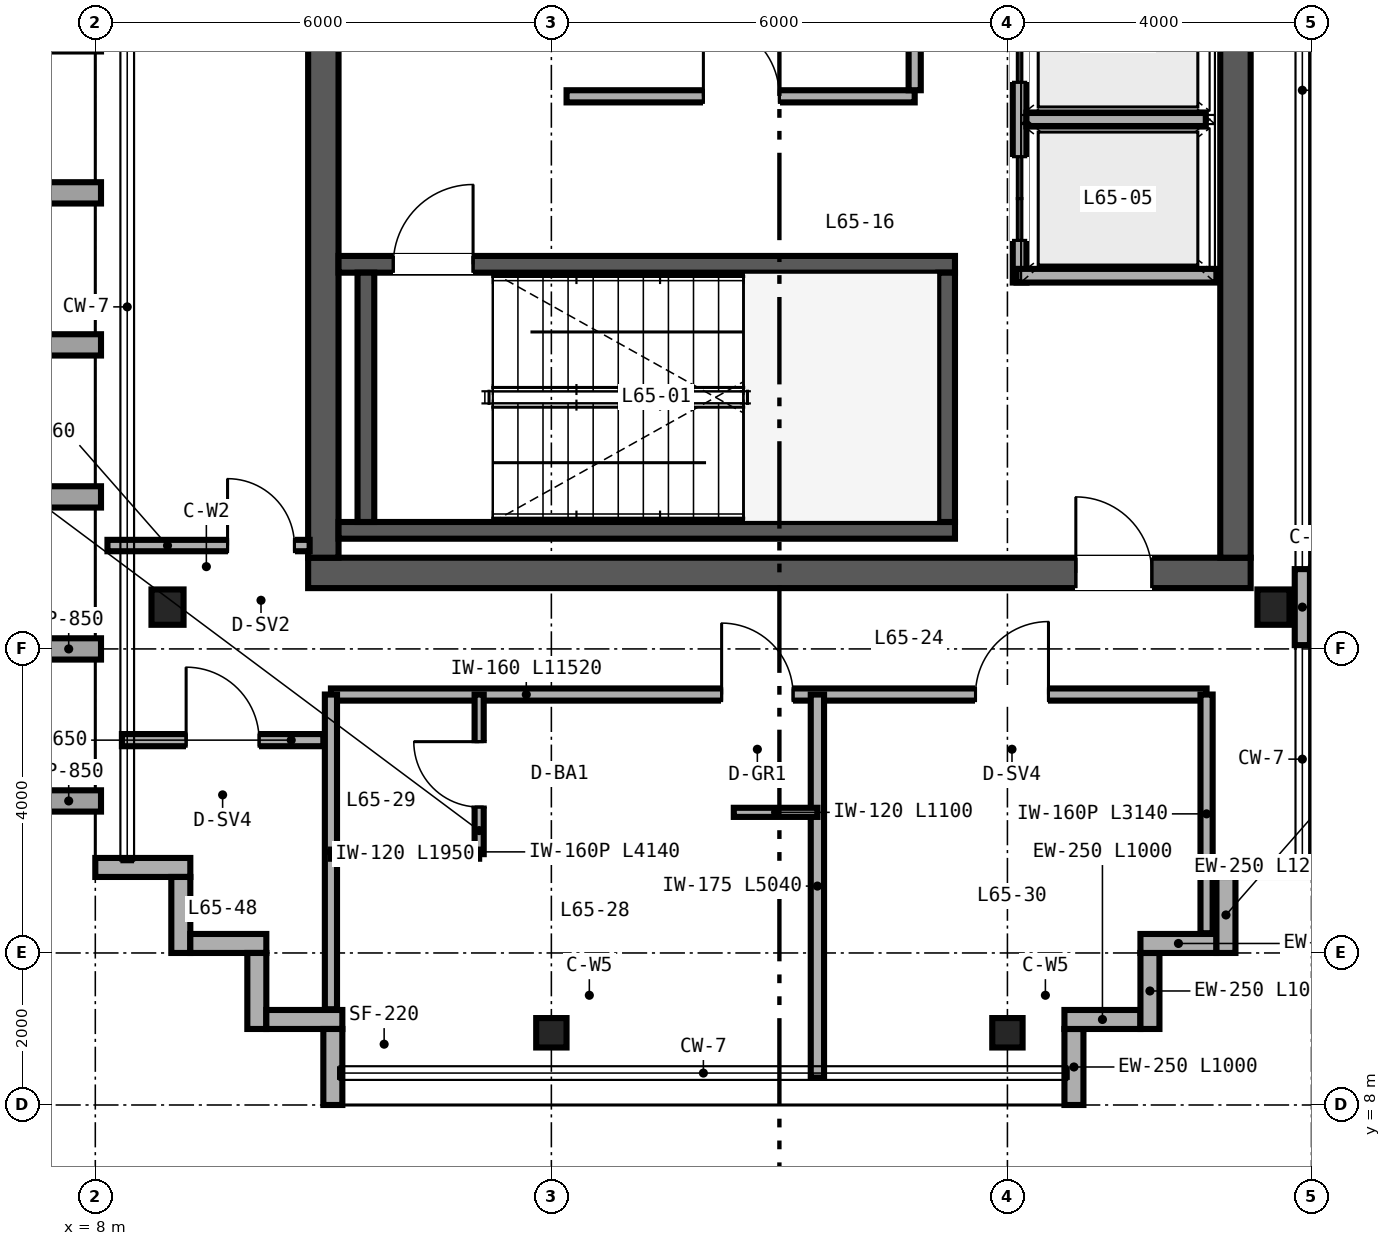
"""IFC4 building model, lengths in metres.
Left out: names, types, materials, properties, quantities, classifications, styles, units other than length and angle.
Written with IfcOpenShell. Run it as: python <this file> out.ifc"""

import sys

from ifc_helpers import new_model, si_unit, direction, frame, frame_2d, origin, origin_2d, place, context, subcontext, project, spatial, rectangle, i_section, extrude, source, transform, mapped, element, fill, save


model = new_model("IFC4")
c1 = context("Model", 3, precision=1e-05, world=origin(), true_north=direction((0.0, 1.0)))
c2 = subcontext(c1, "Body", "Model", "MODEL_VIEW")
j1 = project(units=[si_unit("LENGTHUNIT", "METRE"), si_unit("PLANEANGLEUNIT", "RADIAN")], contexts=[c1])
p1 = place(None, origin())
s1 = spatial("IfcSite", under=j1, at=p1, CompositionType="ELEMENT")
p2 = place(p1, origin())
s2 = spatial("IfcBuilding", under=s1, at=p2, CompositionType="ELEMENT")
p3 = place(p2, frame((0.0, 0.0, 258.0)))
s3 = spatial("IfcBuildingStorey", under=s2, at=p3, CompositionType="ELEMENT", Elevation=258.0)
p4 = place(p3, frame((10.8, 15.0, 0.0), z_axis=(0.0, 0.0, 1.0), x_axis=(1.0, 0.0, 0.0)))
e1 = element("IfcWall", 1, at=p4, inside=s3, PredefinedType="SHEAR", context=c2, shape_type="SweptSolid", body=[
    extrude(rectangle(XDim=12.4, YDim=0.4, at=frame_2d((6.2, 0.0))), origin(), (0.0, 0.0, 1.0), 3.38),
])
p5 = place(p4, frame((10.1, 0.0, 0.0)))
e2 = element("IfcOpeningElement", 2, at=p5, cuts=e1, PredefinedType="OPENING", context=c2, shape_type="SweptSolid", body=[
    extrude(rectangle(XDim=1.0, YDim=2.15, at=frame_2d((0.5, 1.075))), frame((0.0, 0.21, 0.0), z_axis=(0.0, -1.0, 0.0), x_axis=(1.0, 0.0, 0.0)), (0.0, 0.0, 1.0), 0.42),
])
for number, where, z_axis, x_axis in (
    (3, (11.0, 15.2, 0.0), (0.0, 0.0, 1.0), (0.0, 1.0, 0.0)),
    (4, (23.0, 15.2, 0.0), (0.0, 0.0, 1.0), (0.0, 1.0, 0.0)),
):
    element("IfcWall", number, at=place(p3, frame(where, z_axis=z_axis, x_axis=x_axis)), inside=s3, PredefinedType="SHEAR", context=c2, shape_type="SweptSolid", body=[
        extrude(rectangle(XDim=21.6, YDim=0.4, at=frame_2d((10.8, 0.0))), origin(), (0.0, 0.0, 1.0), 3.38),
    ])
p6 = place(p3, frame((11.2, 15.56, 0.0), z_axis=(0.0, 0.0, 1.0), x_axis=(1.0, 0.0, 0.0)))
e5 = element("IfcWall", 5, at=p6, inside=s3, PredefinedType="SHEAR", context=c2, shape_type="SweptSolid", body=[
    extrude(rectangle(XDim=8.11, YDim=0.22, at=frame_2d((4.055, 0.0))), origin(), (0.0, 0.0, 1.0), 3.4),
])
p7 = place(p3, frame((11.2, 19.06, 0.0), z_axis=(0.0, 0.0, 1.0), x_axis=(1.0, 0.0, 0.0)))
e6 = element("IfcWall", 6, at=p7, inside=s3, PredefinedType="SHEAR", context=c2, shape_type="SweptSolid", body=[
    extrude(rectangle(XDim=8.11, YDim=0.22, at=frame_2d((4.055, 0.0))), origin(), (0.0, 0.0, 1.0), 3.4),
])
p8 = place(p7, frame((0.72, 0.0, 0.0)))
e7 = element("IfcOpeningElement", 7, at=p8, cuts=e6, PredefinedType="OPENING", context=c2, shape_type="SweptSolid", body=[
    extrude(rectangle(XDim=1.05, YDim=2.15, at=frame_2d((0.525, 1.075))), frame((0.0, 0.12, 0.0), z_axis=(0.0, -1.0, 0.0), x_axis=(1.0, 0.0, 0.0)), (0.0, 0.0, 1.0), 0.24),
])
for number, where, z_axis, x_axis in (
    (8, (11.56, 15.67, 0.0), (0.0, 0.0, 1.0), (0.0, 1.0, 0.0)),
    (9, (19.2, 15.67, 0.0), (0.0, 0.0, 1.0), (0.0, 1.0, 0.0)),
):
    element("IfcWall", number, at=place(p3, frame(where, z_axis=z_axis, x_axis=x_axis)), inside=s3, PredefinedType="SHEAR", context=c2, shape_type="SweptSolid", body=[
        extrude(rectangle(XDim=3.28, YDim=0.22, at=frame_2d((1.64, 0.0))), origin(), (0.0, 0.0, 1.0), 3.4),
    ])
m1 = source(origin(), c2, "Body", "SweptSolid", [
    extrude(i_section(OverallWidth=0.422, OverallDepth=0.465, WebThickness=0.045, FlangeThickness=0.073, FilletRadius=0.025, at=origin_2d()), origin(), (0.0, 0.0, 1.0), 3.38),
])
for number, where, z_axis, x_axis in (
    (10, (8.95, 14.55, 0.0), (0.0, 0.0, 1.0), (1.0, 0.0, 0.0)),
    (11, (23.5, 14.55, 0.0), (0.0, 0.0, 1.0), (1.0, 0.0, 0.0)),
):
    element("IfcColumn", number, at=place(p3, frame(where, z_axis=z_axis, x_axis=x_axis)), inside=s3, PredefinedType="COLUMN", context=c2, shape_type="MappedRepresentation", body=[
        mapped(m1, transform((0.0, 0.0, 0.0), scale=1.0)),
    ])
m2 = source(origin(), c2, "Body", "SweptSolid", [
    extrude(i_section(OverallWidth=0.399, OverallDepth=0.387, WebThickness=0.021, FlangeThickness=0.033, FilletRadius=0.025, at=origin_2d()), origin(), (0.0, 0.0, 1.0), 3.38),
])
for number, where, z_axis, x_axis in (
    (12, (14.0, 8.95, 0.0), (0.0, 0.0, 1.0), (1.0, 0.0, 0.0)),
    (13, (20.0, 8.95, 0.0), (0.0, 0.0, 1.0), (1.0, 0.0, 0.0)),
):
    element("IfcColumn", number, at=place(p3, frame(where, z_axis=z_axis, x_axis=x_axis)), inside=s3, PredefinedType="COLUMN", context=c2, shape_type="MappedRepresentation", body=[
        mapped(m2, transform((0.0, 0.0, 0.0), scale=1.0)),
    ])
for number, where, z_axis, x_axis in (
    (14, (20.875, 8.0, 0.0), (0.0, 0.0, 1.0), (0.0, 1.0, 0.0)),
    (15, (20.75, 9.125, 0.0), (0.0, 0.0, 1.0), (1.0, 0.0, 0.0)),
    (16, (21.875, 9.0, 0.0), (0.0, 0.0, 1.0), (0.0, 1.0, 0.0)),
    (17, (21.75, 10.125, 0.0), (0.0, 0.0, 1.0), (1.0, 0.0, 0.0)),
    (18, (22.875, 10.0, 0.0), (0.0, 0.0, 1.0), (0.0, 1.0, 0.0)),
):
    element("IfcWall", number, at=place(p3, frame(where, z_axis=z_axis, x_axis=x_axis)), inside=s3, PredefinedType="SOLIDWALL", context=c2, shape_type="SweptSolid", body=[
        extrude(rectangle(XDim=1.0, YDim=0.25, at=frame_2d((0.5, 0.0))), origin(), (0.0, 0.0, 1.0), 3.38),
    ])
for number, where, z_axis, x_axis in (
    (19, (22.75, 11.125, 0.0), (0.0, 0.0, 1.0), (1.0, 0.0, 0.0)),
    (20, (8.0, 11.125, 0.0), (0.0, 0.0, 1.0), (1.0, 0.0, 0.0)),
):
    element("IfcWall", number, at=place(p3, frame(where, z_axis=z_axis, x_axis=x_axis)), inside=s3, PredefinedType="SOLIDWALL", context=c2, shape_type="SweptSolid", body=[
        extrude(rectangle(XDim=1.25, YDim=0.25, at=frame_2d((0.625, 0.0))), origin(), (0.0, 0.0, 1.0), 3.38),
    ])
for number, where, z_axis, x_axis in (
    (21, (9.125, 11.0, 0.0), (0.0, 0.0, 1.0), (0.0, -1.0, 0.0)),
    (22, (9.25, 10.125, 0.0), (0.0, 0.0, 1.0), (1.0, 0.0, 0.0)),
    (23, (10.125, 10.0, 0.0), (0.0, 0.0, 1.0), (0.0, -1.0, 0.0)),
    (24, (10.25, 9.125, 0.0), (0.0, 0.0, 1.0), (1.0, 0.0, 0.0)),
    (25, (11.125, 9.0, 0.0), (0.0, 0.0, 1.0), (0.0, -1.0, 0.0)),
):
    element("IfcWall", number, at=place(p3, frame(where, z_axis=z_axis, x_axis=x_axis)), inside=s3, PredefinedType="SOLIDWALL", context=c2, shape_type="SweptSolid", body=[
        extrude(rectangle(XDim=1.0, YDim=0.25, at=frame_2d((0.5, 0.0))), origin(), (0.0, 0.0, 1.0), 3.38),
    ])
p9 = place(p3, frame((23.88, 14.05, 0.0), z_axis=(0.0, 0.0, 1.0), x_axis=(0.0, 1.0, 0.0)))
e26 = element("IfcWall", 26, at=p9, inside=s3, PredefinedType="PARAPET", context=c2, shape_type="SweptSolid", body=[
    extrude(rectangle(XDim=1.0, YDim=0.2, at=frame_2d((0.5, 0.0))), origin(), (0.0, 0.0, 1.0), 3.38),
])
p10 = place(p3, frame((20.16, 18.82, 0.0), z_axis=(0.0, 0.0, 1.0), x_axis=(0.0, 1.0, 0.0)))
e27 = element("IfcWall", 27, at=p10, inside=s3, PredefinedType="SOLIDWALL", context=c2, shape_type="SweptSolid", body=[
    extrude(rectangle(XDim=6.32, YDim=0.18, at=frame_2d((3.16, 0.0))), origin(), (0.0, 0.0, 1.0), 2.48),
])
p11 = place(p10, frame((0.555, 0.0, 0.0)))
e28 = element("IfcOpeningElement", 28, at=p11, cuts=e27, PredefinedType="OPENING", context=c2, shape_type="SweptSolid", body=[
    extrude(rectangle(XDim=1.1, YDim=2.2, at=frame_2d((0.55, 1.1))), frame((0.0, 0.1, 0.0), z_axis=(0.0, -1.0, 0.0), x_axis=(1.0, 0.0, 0.0)), (0.0, 0.0, 1.0), 0.2),
])
p12 = place(p10, frame((2.635, 0.0, 0.0)))
e29 = element("IfcOpeningElement", 29, at=p12, cuts=e27, PredefinedType="OPENING", context=c2, shape_type="SweptSolid", body=[
    extrude(rectangle(XDim=1.1, YDim=2.2, at=frame_2d((0.55, 1.1))), frame((0.0, 0.1, 0.0), z_axis=(0.0, -1.0, 0.0), x_axis=(1.0, 0.0, 0.0)), (0.0, 0.0, 1.0), 0.2),
])
p13 = place(p10, frame((4.69, 0.0, 0.0)))
e30 = element("IfcOpeningElement", 30, at=p13, cuts=e27, PredefinedType="OPENING", context=c2, shape_type="SweptSolid", body=[
    extrude(rectangle(XDim=1.1, YDim=2.2, at=frame_2d((0.55, 1.1))), frame((0.0, 0.1, 0.0), z_axis=(0.0, -1.0, 0.0), x_axis=(1.0, 0.0, 0.0)), (0.0, 0.0, 1.0), 0.2),
])
p14 = place(p3, frame((20.12, 18.91, 0.0), z_axis=(0.0, 0.0, 1.0), x_axis=(1.0, 0.0, 0.0)))
e31 = element("IfcWall", 31, at=p14, inside=s3, PredefinedType="SOLIDWALL", context=c2, shape_type="SweptSolid", body=[
    extrude(rectangle(XDim=2.63, YDim=0.18, at=frame_2d((1.315, 0.0))), origin(), (0.0, 0.0, 1.0), 3.38),
])
p15 = place(p3, frame((20.25, 20.965, 0.0), z_axis=(0.0, 0.0, 1.0), x_axis=(1.0, 0.0, 0.0)))
e32 = element("IfcWall", 32, at=p15, inside=s3, PredefinedType="SOLIDWALL", context=c2, shape_type="SweptSolid", body=[
    extrude(rectangle(XDim=2.36, YDim=0.18, at=frame_2d((1.18, 0.0))), origin(), (0.0, 0.0, 1.0), 2.48),
])
p16 = place(p3, frame((14.2, 21.27, 0.0), z_axis=(0.0, 0.0, 1.0), x_axis=(1.0, 0.0, 0.0)))
e33 = element("IfcWall", 33, at=p16, inside=s3, PredefinedType="PARTITIONING", context=c2, shape_type="SweptSolid", body=[
    extrude(rectangle(XDim=4.58, YDim=0.16, at=frame_2d((2.29, 0.0))), origin(), (0.0, 0.0, 1.0), 3.38),
])
p17 = place(p16, frame((1.8, 0.0, 0.0)))
e34 = element("IfcOpeningElement", 34, at=p17, cuts=e33, PredefinedType="OPENING", context=c2, shape_type="SweptSolid", body=[
    extrude(rectangle(XDim=1.0, YDim=2.15, at=frame_2d((0.5, 1.075))), frame((0.0, 0.09, 0.0), z_axis=(0.0, -1.0, 0.0), x_axis=(1.0, 0.0, 0.0)), (0.0, 0.0, 1.0), 0.18),
])
p18 = place(p3, frame((18.78, 21.35, 0.0), z_axis=(0.0, 0.0, 1.0), x_axis=(0.0, 1.0, 0.0)))
e35 = element("IfcWall", 35, at=p18, inside=s3, PredefinedType="PARTITIONING", context=c2, shape_type="SweptSolid", body=[
    extrude(rectangle(XDim=3.81, YDim=0.16, at=frame_2d((1.905, 0.0))), origin(), (0.0, 0.0, 1.0), 3.38),
])
p19 = place(p3, frame((11.1, 13.4, 0.0), z_axis=(0.0, 0.0, 1.0), x_axis=(1.0, 0.0, 0.0)))
e36 = element("IfcWall", 36, at=p19, inside=s3, PredefinedType="PARTITIONING", context=c2, shape_type="SweptSolid", body=[
    extrude(rectangle(XDim=11.52, YDim=0.16, at=frame_2d((5.76, 0.0))), origin(), (0.0, 0.0, 1.0), 3.38),
])
p20 = place(p19, frame((5.14, 0.0, 0.0)))
e37 = element("IfcOpeningElement", 37, at=p20, cuts=e36, PredefinedType="OPENING", context=c2, shape_type="SweptSolid", body=[
    extrude(rectangle(XDim=0.94, YDim=2.15, at=frame_2d((0.47, 1.075))), frame((0.0, 0.09, 0.0), z_axis=(0.0, -1.0, 0.0), x_axis=(1.0, 0.0, 0.0)), (0.0, 0.0, 1.0), 0.18),
])
p21 = place(p19, frame((8.48, 0.0, 0.0)))
e38 = element("IfcOpeningElement", 38, at=p21, cuts=e36, PredefinedType="OPENING", context=c2, shape_type="SweptSolid", body=[
    extrude(rectangle(XDim=0.96, YDim=2.15, at=frame_2d((0.48, 1.075))), frame((0.0, 0.09, 0.0), z_axis=(0.0, -1.0, 0.0), x_axis=(1.0, 0.0, 0.0)), (0.0, 0.0, 1.0), 0.18),
])
p22 = place(p3, frame((11.1, 9.26, 0.0), z_axis=(0.0, 0.0, 1.0), x_axis=(0.0, 1.0, 0.0)))
e39 = element("IfcWall", 39, at=p22, inside=s3, PredefinedType="PARTITIONING", context=c2, shape_type="SweptSolid", body=[
    extrude(rectangle(XDim=4.14, YDim=0.16, at=frame_2d((2.07, 0.0))), origin(), (0.0, 0.0, 1.0), 3.38),
])
p23 = place(p3, frame((22.62, 10.26, 0.0), z_axis=(0.0, 0.0, 1.0), x_axis=(0.0, 1.0, 0.0)))
e40 = element("IfcWall", 40, at=p23, inside=s3, PredefinedType="PARTITIONING", context=c2, shape_type="SweptSolid", body=[
    extrude(rectangle(XDim=3.14, YDim=0.16, at=frame_2d((1.57, 0.0))), origin(), (0.0, 0.0, 1.0), 3.38),
])
p24 = place(p3, frame((17.5, 8.36, 0.0), z_axis=(0.0, 0.0, 1.0), x_axis=(0.0, 1.0, 0.0)))
e41 = element("IfcWall", 41, at=p24, inside=s3, PredefinedType="PARTITIONING", context=c2, shape_type="SweptSolid", body=[
    extrude(rectangle(XDim=5.04, YDim=0.175, at=frame_2d((2.52, 0.0))), origin(), (0.0, 0.0, 1.0), 2.687),
])
p25 = place(p3, frame((13.05, 11.3, 0.0), z_axis=(0.0, 0.0, 1.0), x_axis=(0.0, 1.0, 0.0)))
e42 = element("IfcWall", 42, at=p25, inside=s3, PredefinedType="PARTITIONING", context=c2, shape_type="SweptSolid", body=[
    extrude(rectangle(XDim=2.1, YDim=0.12, at=frame_2d((1.05, 0.0))), origin(), (0.0, 0.0, 1.0), 3.38),
])
p26 = place(p25, frame((0.62, 0.0, 0.0)))
e43 = element("IfcOpeningElement", 43, at=p26, cuts=e42, PredefinedType="OPENING", context=c2, shape_type="SweptSolid", body=[
    extrude(rectangle(XDim=0.86, YDim=2.1, at=frame_2d((0.43, 1.05))), frame((0.0, 0.07, 0.0), z_axis=(0.0, -1.0, 0.0), x_axis=(1.0, 0.0, 0.0)), (0.0, 0.0, 1.0), 0.14),
])
p27 = place(p3, frame((11.1, 11.3, 0.0), z_axis=(0.0, 0.0, 1.0), x_axis=(1.0, 0.0, 0.0)))
e44 = element("IfcWall", 44, at=p27, inside=s3, PredefinedType="PARTITIONING", context=c2, shape_type="SweptSolid", body=[
    extrude(rectangle(XDim=1.95, YDim=0.12, at=frame_2d((0.975, 0.0))), origin(), (0.0, 0.0, 1.0), 3.38),
])
p28 = place(p3, frame((16.4, 11.85, 0.0), z_axis=(0.0, 0.0, 1.0), x_axis=(1.0, 0.0, 0.0)))
e45 = element("IfcWall", 45, at=p28, inside=s3, PredefinedType="PARTITIONING", context=c2, shape_type="SweptSolid", body=[
    extrude(rectangle(XDim=1.1, YDim=0.12, at=frame_2d((0.55, 0.0))), origin(), (0.0, 0.0, 1.0), 3.38),
])
p29 = place(p3, frame((8.16, 15.36, 0.0), z_axis=(0.0, 0.0, 1.0), x_axis=(1.0, 0.0, 0.0)))
e46 = element("IfcWall", 46, at=p29, inside=s3, PredefinedType="PARTITIONING", context=c2, shape_type="SweptSolid", body=[
    extrude(rectangle(XDim=2.66, YDim=0.15, at=frame_2d((1.33, 0.0))), origin(), (0.0, 0.0, 1.0), 2.601),
])
p30 = place(p29, frame((1.58, 0.0, 0.0)))
e47 = element("IfcOpeningElement", 47, at=p30, cuts=e46, PredefinedType="OPENING", context=c2, shape_type="SweptSolid", body=[
    extrude(rectangle(XDim=0.88, YDim=2.15, at=frame_2d((0.44, 1.075))), frame((0.0, 0.085, 0.0), z_axis=(0.0, -1.0, 0.0), x_axis=(1.0, 0.0, 0.0)), (0.0, 0.0, 1.0), 0.17),
])
p31 = place(p3, frame((8.35, 12.8, 0.0), z_axis=(0.0, 0.0, 1.0), x_axis=(1.0, 0.0, 0.0)))
e48 = element("IfcWall", 48, at=p31, inside=s3, PredefinedType="PARTITIONING", context=c2, shape_type="SweptSolid", body=[
    extrude(rectangle(XDim=2.65, YDim=0.16, at=frame_2d((1.325, 0.0))), origin(), (0.0, 0.0, 1.0), 3.38),
])
p32 = place(p31, frame((0.845, 0.0, 0.0)))
e49 = element("IfcOpeningElement", 49, at=p32, cuts=e48, PredefinedType="OPENING", context=c2, shape_type="SweptSolid", body=[
    extrude(rectangle(XDim=0.96, YDim=2.15, at=frame_2d((0.48, 1.075))), frame((0.0, 0.09, 0.0), z_axis=(0.0, -1.0, 0.0), x_axis=(1.0, 0.0, 0.0)), (0.0, 0.0, 1.0), 0.18),
])
m3 = source(origin(), c2, "Body", "SweptSolid", [
    extrude(rectangle(XDim=1.05, YDim=2.15, at=frame_2d((0.525, 1.075))), frame((0.0, 0.025, 0.0), z_axis=(0.0, -1.0, 0.0), x_axis=(1.0, 0.0, 0.0)), (0.0, 0.0, 1.0), 0.05),
])
p33 = place(p8, origin())
e50 = element("IfcDoor", 50, at=p33, inside=s3, OperationType="SINGLE_SWING_RIGHT", PredefinedType="DOOR", context=c2, shape_type="MappedRepresentation", body=[
    mapped(m3, transform((0.0, 0.0, 0.0), scale=1.0)),
])
fill(e7, e50)
m4 = source(origin(), c2, "Body", "SweptSolid", [
    extrude(rectangle(XDim=1.1, YDim=2.2, at=frame_2d((0.55, 1.1))), frame((0.0, 0.025, 0.0), z_axis=(0.0, -1.0, 0.0), x_axis=(1.0, 0.0, 0.0)), (0.0, 0.0, 1.0), 0.05),
])
p34 = place(p11, origin())
e51 = element("IfcDoor", 51, at=p34, inside=s3, OperationType="DOUBLE_DOOR_SLIDING", PredefinedType="DOOR", context=c2, shape_type="MappedRepresentation", body=[
    mapped(m4, transform((0.0, 0.0, 0.0), scale=1.0)),
])
fill(e28, e51)
p35 = place(p12, origin())
e52 = element("IfcDoor", 52, at=p35, inside=s3, OperationType="DOUBLE_DOOR_SLIDING", PredefinedType="DOOR", context=c2, shape_type="MappedRepresentation", body=[
    mapped(m4, transform((0.0, 0.0, 0.0), scale=1.0)),
])
fill(e29, e52)
m5 = source(origin(), c2, "Body", "SweptSolid", [
    extrude(rectangle(XDim=1.0, YDim=2.15, at=frame_2d((0.5, 1.075))), frame((0.0, 0.025, 0.0), z_axis=(0.0, -1.0, 0.0), x_axis=(1.0, 0.0, 0.0)), (0.0, 0.0, 1.0), 0.05),
])
p36 = place(p17, origin())
e53 = element("IfcDoor", 53, at=p36, inside=s3, OperationType="SINGLE_SWING_LEFT", PredefinedType="DOOR", context=c2, shape_type="MappedRepresentation", body=[
    mapped(m5, transform((0.0, 0.0, 0.0), scale=1.0)),
])
fill(e34, e53)
p37 = place(p5, origin())
e54 = element("IfcDoor", 54, at=p37, inside=s3, OperationType="SINGLE_SWING_LEFT", PredefinedType="DOOR", context=c2, shape_type="MappedRepresentation", body=[
    mapped(m5, transform((0.0, 0.0, 0.0), scale=1.0)),
])
fill(e2, e54)
m6 = source(origin(), c2, "Body", "SweptSolid", [
    extrude(rectangle(XDim=0.86, YDim=2.1, at=frame_2d((0.43, 1.05))), frame((0.0, 0.025, 0.0), z_axis=(0.0, -1.0, 0.0), x_axis=(1.0, 0.0, 0.0)), (0.0, 0.0, 1.0), 0.05),
])
p38 = place(p26, origin())
e55 = element("IfcDoor", 55, at=p38, inside=s3, OperationType="SINGLE_SWING_RIGHT", PredefinedType="DOOR", context=c2, shape_type="MappedRepresentation", body=[
    mapped(m6, transform((0.0, 0.0, 0.0), scale=1.0)),
])
fill(e43, e55)
m7 = source(origin(), c2, "Body", "SweptSolid", [
    extrude(rectangle(XDim=0.94, YDim=2.15, at=frame_2d((0.47, 1.075))), frame((0.0, 0.025, 0.0), z_axis=(0.0, -1.0, 0.0), x_axis=(1.0, 0.0, 0.0)), (0.0, 0.0, 1.0), 0.05),
])
p39 = place(p20, origin())
e56 = element("IfcDoor", 56, at=p39, inside=s3, OperationType="SINGLE_SWING_LEFT", PredefinedType="DOOR", context=c2, shape_type="MappedRepresentation", body=[
    mapped(m7, transform((0.0, 0.0, 0.0), scale=1.0)),
])
fill(e37, e56)
m8 = source(origin(), c2, "Body", "SweptSolid", [
    extrude(rectangle(XDim=0.96, YDim=2.15, at=frame_2d((0.48, 1.075))), frame((0.0, 0.025, 0.0), z_axis=(0.0, -1.0, 0.0), x_axis=(1.0, 0.0, 0.0)), (0.0, 0.0, 1.0), 0.05),
])
p40 = place(p21, origin())
e57 = element("IfcDoor", 57, at=p40, inside=s3, OperationType="SINGLE_SWING_RIGHT", PredefinedType="DOOR", context=c2, shape_type="MappedRepresentation", body=[
    mapped(m8, transform((0.0, 0.0, 0.0), scale=1.0)),
])
fill(e38, e57)
m9 = source(origin(), c2, "Body", "SweptSolid", [
    extrude(rectangle(XDim=0.88, YDim=2.15, at=frame_2d((0.44, 1.075))), frame((0.0, 0.025, 0.0), z_axis=(0.0, -1.0, 0.0), x_axis=(1.0, 0.0, 0.0)), (0.0, 0.0, 1.0), 0.05),
])
p41 = place(p30, origin())
e58 = element("IfcDoor", 58, at=p41, inside=s3, OperationType="SINGLE_SWING_LEFT", PredefinedType="DOOR", context=c2, shape_type="MappedRepresentation", body=[
    mapped(m9, transform((0.0, 0.0, 0.0), scale=1.0)),
])
fill(e47, e58)
p42 = place(p32, origin())
e59 = element("IfcDoor", 59, at=p42, inside=s3, OperationType="SINGLE_SWING_LEFT", PredefinedType="DOOR", context=c2, shape_type="MappedRepresentation", body=[
    mapped(m8, transform((0.0, 0.0, 0.0), scale=1.0)),
])
fill(e49, e59)
save(model, sys.argv[1])
